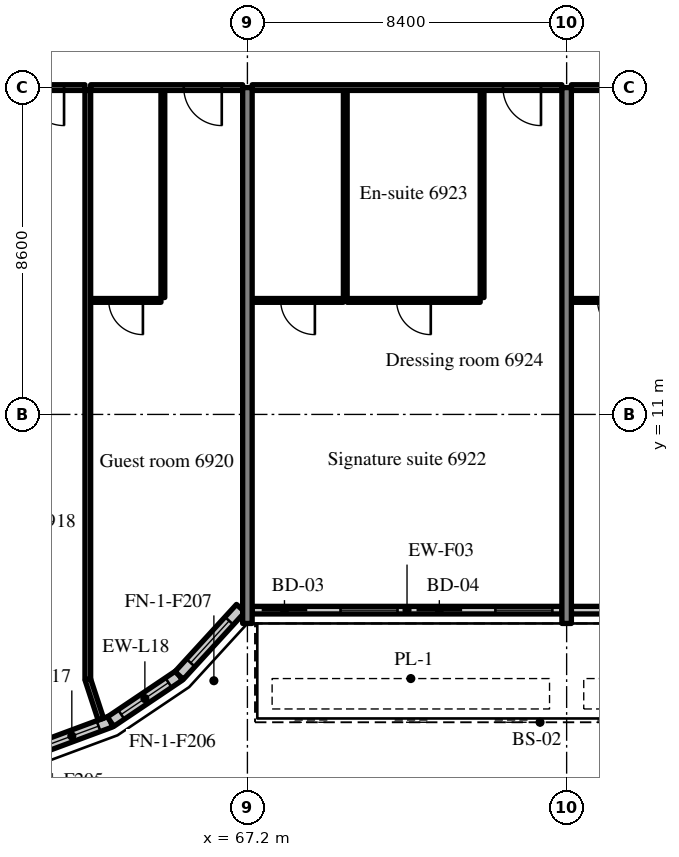
"""IFC4 building model, lengths in metres.
Left out: names, types, materials, properties, quantities, classifications, styles, units other than length and angle.
Written with IfcOpenShell. Run it as: python <this file> out.ifc"""

import sys

from ifc_helpers import new_model, si_unit, direction, frame, frame_2d, origin, place, context, subcontext, project, spatial, rectangle, extrude, source, transform, mapped, element, fill, save


model = new_model("IFC4")
c1 = context("Model", 3, precision=1e-05, world=origin(), true_north=direction((0.0, 1.0)))
c2 = subcontext(c1, "Body", "Model", "MODEL_VIEW")
j1 = project(units=[si_unit("LENGTHUNIT", "METRE"), si_unit("PLANEANGLEUNIT", "RADIAN")], contexts=[c1])
p1 = place(None, origin())
s1 = spatial("IfcSite", under=j1, at=p1, CompositionType="ELEMENT")
p2 = place(p1, origin())
s2 = spatial("IfcBuilding", under=s1, at=p2, CompositionType="ELEMENT")
p3 = place(p2, frame((0.0, 0.0, 289.7)))
s3 = spatial("IfcBuildingStorey", under=s2, at=p3, CompositionType="ELEMENT", Elevation=289.7)
m1 = source(origin(), c2, "Body", "SweptSolid", [
    extrude(rectangle(XDim=14.1, YDim=0.25, at=frame_2d((7.05, 0.0))), origin(), (0.0, 0.0, 1.0), 3.72),
])
for number, where, z_axis, x_axis in (
    (1, (67.2, 5.5, 0.0), (0.0, 0.0, 1.0), (0.0, 1.0, 0.0)),
    (2, (75.6, 5.5, 0.0), (0.0, 0.0, 1.0), (0.0, 1.0, 0.0)),
):
    element("IfcWall", number, at=place(p3, frame(where, z_axis=z_axis, x_axis=x_axis)), inside=s3, PredefinedType="SHEAR", context=c2, shape_type="MappedRepresentation", body=[
        mapped(m1, transform((0.0, 0.0, 0.0), scale=1.0)),
    ])
m2 = source(origin(), c2, "Body", "SweptSolid", [
    extrude(rectangle(XDim=2.176, YDim=0.3, at=frame_2d((1.088, 0.0))), origin(), (0.0, 0.0, 1.0), 3.72),
])
p4 = place(p3, frame((61.56, 2.16, 0.0), z_axis=(0.0, 0.0, 1.0), x_axis=(0.937531979054, 0.347899106424, 0.0)))
e3 = element("IfcWall", 3, at=p4, inside=s3, PredefinedType="SOLIDWALL", context=c2, shape_type="MappedRepresentation", body=[
    mapped(m2, transform((0.0, 0.0, 0.0), scale=1.0)),
])
m3 = source(origin(), c2, "Body", "SweptSolid", [
    extrude(rectangle(XDim=1.5, YDim=2.0, at=frame_2d((0.75, 1.0))), frame((0.0, 0.16, 0.0), z_axis=(0.0, -1.0, 0.0), x_axis=(1.0, 0.0, 0.0)), (0.0, 0.0, 1.0), 0.32),
])
p5 = place(p4, frame((0.338, 0.0, 0.9)))
e4 = element("IfcOpeningElement", 4, at=p5, cuts=e3, PredefinedType="OPENING", context=c2, shape_type="MappedRepresentation", body=[
    mapped(m3, transform((0.0, 0.0, 0.0), scale=1.0)),
])
m4 = source(origin(), c2, "Body", "SweptSolid", [
    extrude(rectangle(XDim=2.176, YDim=0.3, at=frame_2d((1.088, 0.0))), origin(), (0.0, 0.0, 1.0), 3.72),
])
p6 = place(p3, frame((63.599, 2.917, 0.0), z_axis=(0.0, 0.0, 1.0), x_axis=(0.829625727223, 0.558319937607, 0.0)))
e5 = element("IfcWall", 5, at=p6, inside=s3, PredefinedType="SOLIDWALL", context=c2, shape_type="MappedRepresentation", body=[
    mapped(m4, transform((0.0, 0.0, 0.0), scale=1.0)),
])
p7 = place(p6, frame((0.338, 0.0, 0.9)))
e6 = element("IfcOpeningElement", 6, at=p7, cuts=e5, PredefinedType="OPENING", context=c2, shape_type="MappedRepresentation", body=[
    mapped(m3, transform((0.0, 0.0, 0.0), scale=1.0)),
])
m5 = source(origin(), c2, "Body", "SweptSolid", [
    extrude(rectangle(XDim=2.398, YDim=0.3, at=frame_2d((1.199, 0.0))), origin(), (0.0, 0.0, 1.0), 3.72),
])
p8 = place(p3, frame((65.404, 4.131, 0.0), z_axis=(0.0, 0.0, 1.0), x_axis=(0.675374189419, 0.737475222815, 0.0)))
e7 = element("IfcWall", 7, at=p8, inside=s3, PredefinedType="SOLIDWALL", context=c2, shape_type="MappedRepresentation", body=[
    mapped(m5, transform((0.0, 0.0, 0.0), scale=1.0)),
])
p9 = place(p8, frame((0.449, 0.0, 0.9)))
e8 = element("IfcOpeningElement", 8, at=p9, cuts=e7, PredefinedType="OPENING", context=c2, shape_type="MappedRepresentation", body=[
    mapped(m3, transform((0.0, 0.0, 0.0), scale=1.0)),
])
m6 = source(origin(), c2, "Body", "SweptSolid", [
    extrude(rectangle(XDim=8.15, YDim=0.2, at=frame_2d((4.075, 0.0))), origin(), (0.0, 0.0, 1.0), 3.17),
])
p10 = place(p3, frame((67.325, 5.85, 0.0), z_axis=(0.0, 0.0, 1.0), x_axis=(1.0, 0.0, 0.0)))
e9 = element("IfcWall", 9, at=p10, inside=s3, PredefinedType="SOLIDWALL", context=c2, shape_type="MappedRepresentation", body=[
    mapped(m6, transform((0.0, 0.0, 0.0), scale=1.0)),
])
m7 = source(origin(), c2, "Body", "SweptSolid", [
    extrude(rectangle(XDim=1.2, YDim=2.4, at=frame_2d((0.6, 1.2))), frame((0.0, 0.11, 0.0), z_axis=(0.0, -1.0, 0.0), x_axis=(1.0, 0.0, 0.0)), (0.0, 0.0, 1.0), 0.22),
])
p11 = place(p10, frame((0.25, 0.0, 0.0)))
e10 = element("IfcOpeningElement", 10, at=p11, cuts=e9, PredefinedType="OPENING", context=c2, shape_type="MappedRepresentation", body=[
    mapped(m7, transform((0.0, 0.0, 0.0), scale=1.0)),
])
m8 = source(origin(), c2, "Body", "SweptSolid", [
    extrude(rectangle(XDim=1.5, YDim=1.5, at=frame_2d((0.75, 0.75))), frame((0.0, 0.11, 0.0), z_axis=(0.0, -1.0, 0.0), x_axis=(1.0, 0.0, 0.0)), (0.0, 0.0, 1.0), 0.22),
])
p12 = place(p10, frame((2.325, 0.0, 0.9)))
e11 = element("IfcOpeningElement", 11, at=p12, cuts=e9, PredefinedType="OPENING", context=c2, shape_type="MappedRepresentation", body=[
    mapped(m8, transform((0.0, 0.0, 0.0), scale=1.0)),
])
p13 = place(p10, frame((4.325, 0.0, 0.0)))
e12 = element("IfcOpeningElement", 12, at=p13, cuts=e9, PredefinedType="OPENING", context=c2, shape_type="MappedRepresentation", body=[
    mapped(m7, transform((0.0, 0.0, 0.0), scale=1.0)),
])
p14 = place(p10, frame((6.4, 0.0, 0.9)))
e13 = element("IfcOpeningElement", 13, at=p14, cuts=e9, PredefinedType="OPENING", context=c2, shape_type="MappedRepresentation", body=[
    mapped(m8, transform((0.0, 0.0, 0.0), scale=1.0)),
])
m9 = source(origin(), c2, "Body", "SweptSolid", [
    extrude(rectangle(XDim=6.53, YDim=0.2, at=frame_2d((3.265, 0.0))), origin(), (0.0, 0.0, 1.0), 3.17),
])
p15 = place(p3, frame((75.725, 5.85, 0.0), z_axis=(0.0, 0.0, 1.0), x_axis=(1.0, 0.0, 0.0)))
e14 = element("IfcWall", 14, at=p15, inside=s3, PredefinedType="SOLIDWALL", context=c2, shape_type="MappedRepresentation", body=[
    mapped(m9, transform((0.0, 0.0, 0.0), scale=1.0)),
])
p16 = place(p15, frame((0.883, 0.0, 0.9)))
e15 = element("IfcOpeningElement", 15, at=p16, cuts=e14, PredefinedType="OPENING", context=c2, shape_type="MappedRepresentation", body=[
    mapped(m8, transform((0.0, 0.0, 0.0), scale=1.0)),
])
p17 = place(p15, frame((4.147, 0.0, 0.9)))
e16 = element("IfcOpeningElement", 16, at=p17, cuts=e14, PredefinedType="OPENING", context=c2, shape_type="MappedRepresentation", body=[
    mapped(m8, transform((0.0, 0.0, 0.0), scale=1.0)),
])
m10 = source(origin(), c2, "Body", "SweptSolid", [
    extrude(rectangle(XDim=4.0, YDim=0.15, at=frame_2d((2.0, 0.0))), origin(), (0.0, 0.0, 1.0), 3.02),
])
p18 = place(p3, frame((58.925, 19.6, 0.0), z_axis=(0.0, 0.0, 1.0), x_axis=(1.0, 0.0, 0.0)))
e17 = element("IfcWall", 17, at=p18, inside=s3, PredefinedType="PARTITIONING", context=c2, shape_type="MappedRepresentation", body=[
    mapped(m10, transform((0.0, 0.0, 0.0), scale=1.0)),
])
m11 = source(origin(), c2, "Body", "SweptSolid", [
    extrude(rectangle(XDim=1.0, YDim=2.1, at=frame_2d((0.5, 1.05))), frame((0.0, 0.085, 0.0), z_axis=(0.0, -1.0, 0.0), x_axis=(1.0, 0.0, 0.0)), (0.0, 0.0, 1.0), 0.17),
])
p19 = place(p18, frame((2.45, 0.0, 0.0)))
e18 = element("IfcOpeningElement", 18, at=p19, cuts=e17, PredefinedType="OPENING", context=c2, shape_type="MappedRepresentation", body=[
    mapped(m11, transform((0.0, 0.0, 0.0), scale=1.0)),
])
m12 = source(origin(), c2, "Body", "SweptSolid", [
    extrude(rectangle(XDim=5.45, YDim=0.1, at=frame_2d((2.725, 0.0))), origin(), (0.0, 0.0, 1.0), 3.72),
])
p20 = place(p3, frame((64.975, 14.075, 0.0), z_axis=(0.0, 0.0, 1.0), x_axis=(0.0, 1.0, 0.0)))
e19 = element("IfcWall", 19, at=p20, inside=s3, PredefinedType="PARTITIONING", context=c2, shape_type="MappedRepresentation", body=[
    mapped(m12, transform((0.0, 0.0, 0.0), scale=1.0)),
])
m13 = source(origin(), c2, "Body", "SweptSolid", [
    extrude(rectangle(XDim=1.85, YDim=0.1, at=frame_2d((0.925, 0.0))), origin(), (0.0, 0.0, 1.0), 3.72),
])
p21 = place(p3, frame((63.075, 14.0, 0.0), z_axis=(0.0, 0.0, 1.0), x_axis=(1.0, 0.0, 0.0)))
e20 = element("IfcWall", 20, at=p21, inside=s3, PredefinedType="PARTITIONING", context=c2, shape_type="MappedRepresentation", body=[
    mapped(m13, transform((0.0, 0.0, 0.0), scale=1.0)),
])
m14 = source(origin(), c2, "Body", "SweptSolid", [
    extrude(rectangle(XDim=0.9, YDim=2.1, at=frame_2d((0.45, 1.05))), frame((0.0, 0.06, 0.0), z_axis=(0.0, -1.0, 0.0), x_axis=(1.0, 0.0, 0.0)), (0.0, 0.0, 1.0), 0.12),
])
p22 = place(p21, frame((0.475, 0.0, 0.0)))
e21 = element("IfcOpeningElement", 21, at=p22, cuts=e20, PredefinedType="OPENING", context=c2, shape_type="MappedRepresentation", body=[
    mapped(m14, transform((0.0, 0.0, 0.0), scale=1.0)),
])
p23 = place(p3, frame((63.075, 19.6, 0.0), z_axis=(0.0, 0.0, 1.0), x_axis=(1.0, 0.0, 0.0)))
e22 = element("IfcWall", 22, at=p23, inside=s3, PredefinedType="PARTITIONING", context=c2, shape_type="MappedRepresentation", body=[
    mapped(m10, transform((0.0, 0.0, 0.0), scale=1.0)),
])
p24 = place(p23, frame((2.45, 0.0, 0.0)))
e23 = element("IfcOpeningElement", 23, at=p24, cuts=e22, PredefinedType="OPENING", context=c2, shape_type="MappedRepresentation", body=[
    mapped(m11, transform((0.0, 0.0, 0.0), scale=1.0)),
])
m15 = source(origin(), c2, "Body", "SweptSolid", [
    extrude(rectangle(XDim=15.498, YDim=0.15, at=frame_2d((7.749, 0.0))), origin(), (0.0, 0.0, 1.0), 3.72),
])
p25 = place(p3, frame((63.0, 4.027, 0.0), z_axis=(0.0, 0.0, 1.0), x_axis=(0.0, 1.0, 0.0)))
e24 = element("IfcWall", 24, at=p25, inside=s3, PredefinedType="PARTITIONING", context=c2, shape_type="MappedRepresentation", body=[
    mapped(m15, transform((0.0, 0.0, 0.0), scale=1.0)),
])
for number, where, z_axis, x_axis in (
    (25, (73.375, 14.075, 0.0), (0.0, 0.0, 1.0), (0.0, 1.0, 0.0)),
    (26, (69.775, 14.075, 0.0), (0.0, 0.0, 1.0), (0.0, 1.0, 0.0)),
):
    element("IfcWall", number, at=place(p3, frame(where, z_axis=z_axis, x_axis=x_axis)), inside=s3, PredefinedType="PARTITIONING", context=c2, shape_type="MappedRepresentation", body=[
        mapped(m12, transform((0.0, 0.0, 0.0), scale=1.0)),
    ])
m16 = source(origin(), c2, "Body", "SweptSolid", [
    extrude(rectangle(XDim=3.5, YDim=0.1, at=frame_2d((1.75, 0.0))), origin(), (0.0, 0.0, 1.0), 3.72),
])
p26 = place(p3, frame((69.825, 14.0, 0.0), z_axis=(0.0, 0.0, 1.0), x_axis=(1.0, 0.0, 0.0)))
e27 = element("IfcWall", 27, at=p26, inside=s3, PredefinedType="PARTITIONING", context=c2, shape_type="MappedRepresentation", body=[
    mapped(m16, transform((0.0, 0.0, 0.0), scale=1.0)),
])
p27 = place(p26, frame((1.3, 0.0, 0.0)))
e28 = element("IfcOpeningElement", 28, at=p27, cuts=e27, PredefinedType="OPENING", context=c2, shape_type="MappedRepresentation", body=[
    mapped(m14, transform((0.0, 0.0, 0.0), scale=1.0)),
])
m17 = source(origin(), c2, "Body", "SweptSolid", [
    extrude(rectangle(XDim=2.4, YDim=0.1, at=frame_2d((1.2, 0.0))), origin(), (0.0, 0.0, 1.0), 3.72),
])
p28 = place(p3, frame((67.325, 14.0, 0.0), z_axis=(0.0, 0.0, 1.0), x_axis=(1.0, 0.0, 0.0)))
e29 = element("IfcWall", 29, at=p28, inside=s3, PredefinedType="PARTITIONING", context=c2, shape_type="MappedRepresentation", body=[
    mapped(m17, transform((0.0, 0.0, 0.0), scale=1.0)),
])
p29 = place(p28, frame((0.75, 0.0, 0.0)))
e30 = element("IfcOpeningElement", 30, at=p29, cuts=e29, PredefinedType="OPENING", context=c2, shape_type="MappedRepresentation", body=[
    mapped(m14, transform((0.0, 0.0, 0.0), scale=1.0)),
])
m18 = source(origin(), c2, "Body", "SweptSolid", [
    extrude(rectangle(XDim=8.15, YDim=0.15, at=frame_2d((4.075, 0.0))), origin(), (0.0, 0.0, 1.0), 3.02),
])
p30 = place(p3, frame((67.325, 19.6, 0.0), z_axis=(0.0, 0.0, 1.0), x_axis=(1.0, 0.0, 0.0)))
e31 = element("IfcWall", 31, at=p30, inside=s3, PredefinedType="PARTITIONING", context=c2, shape_type="MappedRepresentation", body=[
    mapped(m18, transform((0.0, 0.0, 0.0), scale=1.0)),
])
p31 = place(p30, frame((6.6, 0.0, 0.0)))
e32 = element("IfcOpeningElement", 32, at=p31, cuts=e31, PredefinedType="OPENING", context=c2, shape_type="MappedRepresentation", body=[
    mapped(m11, transform((0.0, 0.0, 0.0), scale=1.0)),
])
m19 = source(origin(), c2, "Body", "SweptSolid", [
    extrude(rectangle(XDim=2.275, YDim=0.1, at=frame_2d((1.137, 0.0))), origin(), (0.0, 0.0, 1.0), 3.72),
])
p32 = place(p3, frame((75.725, 14.0, 0.0), z_axis=(0.0, 0.0, 1.0), x_axis=(1.0, 0.0, 0.0)))
e33 = element("IfcWall", 33, at=p32, inside=s3, PredefinedType="PARTITIONING", context=c2, shape_type="MappedRepresentation", body=[
    mapped(m19, transform((0.0, 0.0, 0.0), scale=1.0)),
])
p33 = place(p32, frame((0.688, 0.0, 0.0)))
e34 = element("IfcOpeningElement", 34, at=p33, cuts=e33, PredefinedType="OPENING", context=c2, shape_type="MappedRepresentation", body=[
    mapped(m14, transform((0.0, 0.0, 0.0), scale=1.0)),
])
m20 = source(origin(), c2, "Body", "SweptSolid", [
    extrude(rectangle(XDim=8.025, YDim=0.15, at=frame_2d((4.012, 0.0))), origin(), (0.0, 0.0, 1.0), 3.02),
])
p34 = place(p3, frame((75.725, 19.6, 0.0), z_axis=(0.0, 0.0, 1.0), x_axis=(1.0, 0.0, 0.0)))
e35 = element("IfcWall", 35, at=p34, inside=s3, PredefinedType="PARTITIONING", context=c2, shape_type="MappedRepresentation", body=[
    mapped(m20, transform((0.0, 0.0, 0.0), scale=1.0)),
])
p35 = place(p34, frame((6.475, 0.0, 0.0)))
e36 = element("IfcOpeningElement", 36, at=p35, cuts=e35, PredefinedType="OPENING", context=c2, shape_type="MappedRepresentation", body=[
    mapped(m11, transform((0.0, 0.0, 0.0), scale=1.0)),
])
m21 = source(origin(), c2, "Body", "SweptSolid", [
    extrude(rectangle(XDim=1.101, YDim=0.15, at=frame_2d((0.55, 0.0))), origin(), (0.0, 0.0, 1.0), 3.72),
])
p36 = place(p3, frame((63.343, 2.981, 0.0), z_axis=(0.0, 0.0, 1.0), x_axis=(-0.311567081539, 0.950224159712, 0.0)))
e37 = element("IfcWall", 37, at=p36, inside=s3, PredefinedType="PARTITIONING", context=c2, shape_type="MappedRepresentation", body=[
    mapped(m21, transform((0.0, 0.0, 0.0), scale=1.0)),
])
m22 = source(origin(), c2, "Body", "SweptSolid", [
    extrude(rectangle(XDim=1.5, YDim=2.0, at=frame_2d((0.75, 1.0))), frame((0.0, 0.03, 0.0), z_axis=(0.0, -1.0, 0.0), x_axis=(1.0, 0.0, 0.0)), (0.0, 0.0, 1.0), 0.06),
])
p37 = place(p5, origin())
e38 = element("IfcWindow", 38, at=p37, inside=s3, PartitioningType="SINGLE_PANEL", PredefinedType="WINDOW", context=c2, shape_type="MappedRepresentation", body=[
    mapped(m22, transform((0.0, 0.0, 0.0), scale=1.0)),
])
fill(e4, e38)
p38 = place(p7, origin())
e39 = element("IfcWindow", 39, at=p38, inside=s3, PartitioningType="SINGLE_PANEL", PredefinedType="WINDOW", context=c2, shape_type="MappedRepresentation", body=[
    mapped(m22, transform((0.0, 0.0, 0.0), scale=1.0)),
])
fill(e6, e39)
p39 = place(p9, origin())
e40 = element("IfcWindow", 40, at=p39, inside=s3, PartitioningType="SINGLE_PANEL", PredefinedType="WINDOW", context=c2, shape_type="MappedRepresentation", body=[
    mapped(m22, transform((0.0, 0.0, 0.0), scale=1.0)),
])
fill(e8, e40)
m23 = source(origin(), c2, "Body", "SweptSolid", [
    extrude(rectangle(XDim=1.2, YDim=2.4, at=frame_2d((0.6, 1.2))), frame((0.0, 0.025, 0.0), z_axis=(0.0, -1.0, 0.0), x_axis=(1.0, 0.0, 0.0)), (0.0, 0.0, 1.0), 0.05),
])
p40 = place(p11, origin())
e41 = element("IfcDoor", 41, at=p40, inside=s3, OperationType="SLIDING_TO_LEFT", PredefinedType="DOOR", context=c2, shape_type="MappedRepresentation", body=[
    mapped(m23, transform((0.0, 0.0, 0.0), scale=1.0)),
])
fill(e10, e41)
m24 = source(origin(), c2, "Body", "SweptSolid", [
    extrude(rectangle(XDim=1.5, YDim=1.5, at=frame_2d((0.75, 0.75))), frame((0.0, 0.03, 0.0), z_axis=(0.0, -1.0, 0.0), x_axis=(1.0, 0.0, 0.0)), (0.0, 0.0, 1.0), 0.06),
])
p41 = place(p12, origin())
e42 = element("IfcWindow", 42, at=p41, inside=s3, PartitioningType="SINGLE_PANEL", PredefinedType="WINDOW", context=c2, shape_type="MappedRepresentation", body=[
    mapped(m24, transform((0.0, 0.0, 0.0), scale=1.0)),
])
fill(e11, e42)
p42 = place(p13, origin())
e43 = element("IfcDoor", 43, at=p42, inside=s3, OperationType="SLIDING_TO_RIGHT", PredefinedType="DOOR", context=c2, shape_type="MappedRepresentation", body=[
    mapped(m23, transform((0.0, 0.0, 0.0), scale=1.0)),
])
fill(e12, e43)
p43 = place(p14, origin())
e44 = element("IfcWindow", 44, at=p43, inside=s3, PartitioningType="SINGLE_PANEL", PredefinedType="WINDOW", context=c2, shape_type="MappedRepresentation", body=[
    mapped(m24, transform((0.0, 0.0, 0.0), scale=1.0)),
])
fill(e13, e44)
m25 = source(origin(), c2, "Body", "SweptSolid", [
    extrude(rectangle(XDim=1.0, YDim=2.1, at=frame_2d((0.5, 1.05))), frame((0.0, 0.025, 0.0), z_axis=(0.0, -1.0, 0.0), x_axis=(1.0, 0.0, 0.0)), (0.0, 0.0, 1.0), 0.05),
])
p44 = place(p19, origin())
e45 = element("IfcDoor", 45, at=p44, inside=s3, OperationType="SINGLE_SWING_RIGHT", PredefinedType="DOOR", context=c2, shape_type="MappedRepresentation", body=[
    mapped(m25, transform((0.0, 0.0, 0.0), scale=1.0)),
])
fill(e18, e45)
m26 = source(origin(), c2, "Body", "SweptSolid", [
    extrude(rectangle(XDim=0.9, YDim=2.1, at=frame_2d((0.45, 1.05))), frame((0.0, 0.025, 0.0), z_axis=(0.0, -1.0, 0.0), x_axis=(1.0, 0.0, 0.0)), (0.0, 0.0, 1.0), 0.05),
])
p45 = place(p22, origin())
e46 = element("IfcDoor", 46, at=p45, inside=s3, OperationType="SINGLE_SWING_RIGHT", PredefinedType="DOOR", context=c2, shape_type="MappedRepresentation", body=[
    mapped(m26, transform((0.0, 0.0, 0.0), scale=1.0)),
])
fill(e21, e46)
p46 = place(p24, origin())
e47 = element("IfcDoor", 47, at=p46, inside=s3, OperationType="SINGLE_SWING_RIGHT", PredefinedType="DOOR", context=c2, shape_type="MappedRepresentation", body=[
    mapped(m25, transform((0.0, 0.0, 0.0), scale=1.0)),
])
fill(e23, e47)
p47 = place(p27, origin())
e48 = element("IfcDoor", 48, at=p47, inside=s3, OperationType="SINGLE_SWING_RIGHT", PredefinedType="DOOR", context=c2, shape_type="MappedRepresentation", body=[
    mapped(m26, transform((0.0, 0.0, 0.0), scale=1.0)),
])
fill(e28, e48)
p48 = place(p29, origin())
e49 = element("IfcDoor", 49, at=p48, inside=s3, OperationType="SINGLE_SWING_RIGHT", PredefinedType="DOOR", context=c2, shape_type="MappedRepresentation", body=[
    mapped(m26, transform((0.0, 0.0, 0.0), scale=1.0)),
])
fill(e30, e49)
p49 = place(p31, origin())
e50 = element("IfcDoor", 50, at=p49, inside=s3, OperationType="SINGLE_SWING_RIGHT", PredefinedType="DOOR", context=c2, shape_type="MappedRepresentation", body=[
    mapped(m25, transform((0.0, 0.0, 0.0), scale=1.0)),
])
fill(e32, e50)
p50 = place(p33, origin())
e51 = element("IfcDoor", 51, at=p50, inside=s3, OperationType="SINGLE_SWING_RIGHT", PredefinedType="DOOR", context=c2, shape_type="MappedRepresentation", body=[
    mapped(m26, transform((0.0, 0.0, 0.0), scale=1.0)),
])
fill(e34, e51)
save(model, sys.argv[1])
